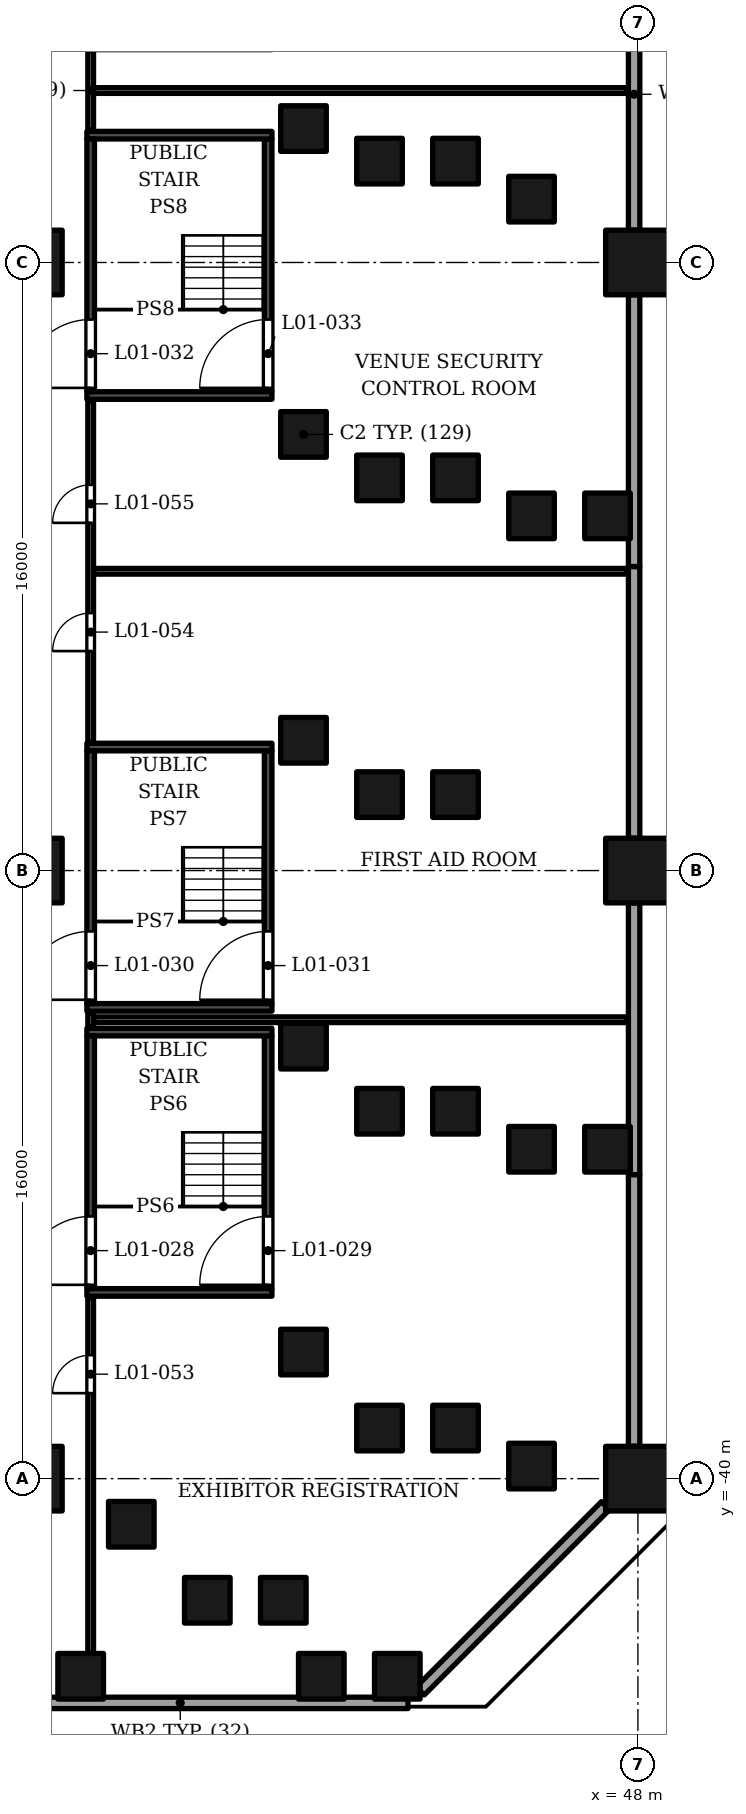
"""IFC4 building model, lengths in metres.
Left out: names, types, materials, properties, quantities, classifications, styles, units other than length and angle.
Written with IfcOpenShell. Run it as: python <this file> out.ifc"""

import sys

from ifc_helpers import new_model, si_unit, direction, frame, frame_2d, origin, origin_2d, place, context, subcontext, project, spatial, rectangle, extrude, element, fill, save


model = new_model("IFC4")
c1 = context("Model", 3, precision=1e-05, world=origin(), true_north=direction((0.0, 1.0)))
c2 = subcontext(c1, "Body", "Model", "MODEL_VIEW")
j1 = project(units=[si_unit("LENGTHUNIT", "METRE"), si_unit("PLANEANGLEUNIT", "RADIAN")], contexts=[c1])
p1 = place(None, origin())
s1 = spatial("IfcSite", under=j1, at=p1, CompositionType="ELEMENT")
p2 = place(p1, origin())
s2 = spatial("IfcBuilding", under=s1, at=p2, CompositionType="ELEMENT")
p3 = place(p2, frame((0.0, 0.0, 9.0)))
s3 = spatial("IfcBuildingStorey", under=s2, at=p3, CompositionType="ELEMENT", Elevation=9.0)
for number, where, z_axis, x_axis in (
    (1, (32.0, -40.0, 0.0), (0.0, 0.0, 1.0), (1.0, 0.0, 0.0)),
    (2, (32.0, -24.0, 0.0), (0.0, 0.0, 1.0), (1.0, 0.0, 0.0)),
    (3, (32.0, -8.0, 0.0), (0.0, 0.0, 1.0), (1.0, 0.0, 0.0)),
    (4, (48.0, -40.0, 0.0), (0.0, 0.0, 1.0), (1.0, 0.0, 0.0)),
    (5, (48.0, -24.0, 0.0), (0.0, 0.0, 1.0), (1.0, 0.0, 0.0)),
    (6, (48.0, -8.0, 0.0), (0.0, 0.0, 1.0), (1.0, 0.0, 0.0)),
):
    element("IfcColumn", number, at=place(p3, frame(where, z_axis=z_axis, x_axis=x_axis)), inside=s3, PredefinedType="COLUMN", context=c2, shape_type="SweptSolid", body=[
        extrude(rectangle(XDim=1.7, YDim=1.7, at=origin_2d()), origin(), (0.0, 0.0, 1.0), 11.0),
    ])
for number, where, z_axis, x_axis in (
    (7, (39.2, -36.669, 0.0), (0.0, 0.0, 1.0), (1.0, 0.0, 0.0)),
    (8, (34.669, -41.2, 0.0), (0.0, 0.0, 1.0), (1.0, 0.0, 0.0)),
    (9, (39.2, -4.476, 0.0), (0.0, 0.0, 1.0), (1.0, 0.0, 0.0)),
    (10, (39.2, -12.524, 0.0), (0.0, 0.0, 1.0), (1.0, 0.0, 0.0)),
    (11, (39.2, -20.572, 0.0), (0.0, 0.0, 1.0), (1.0, 0.0, 0.0)),
    (12, (39.2, -28.62, 0.0), (0.0, 0.0, 1.0), (1.0, 0.0, 0.0)),
    (13, (41.2, -38.669, 0.0), (0.0, 0.0, 1.0), (1.0, 0.0, 0.0)),
    (14, (36.669, -43.2, 0.0), (0.0, 0.0, 1.0), (1.0, 0.0, 0.0)),
    (15, (41.2, -5.333, 0.0), (0.0, 0.0, 1.0), (1.0, 0.0, 0.0)),
    (16, (41.2, -13.667, 0.0), (0.0, 0.0, 1.0), (1.0, 0.0, 0.0)),
    (17, (41.2, -22.001, 0.0), (0.0, 0.0, 1.0), (1.0, 0.0, 0.0)),
    (18, (41.2, -30.333, 0.0), (0.0, 0.0, 1.0), (1.0, 0.0, 0.0)),
    (19, (43.2, -38.669, 0.0), (0.0, 0.0, 1.0), (1.0, 0.0, 0.0)),
    (20, (38.669, -43.2, 0.0), (0.0, 0.0, 1.0), (1.0, 0.0, 0.0)),
    (21, (43.2, -5.333, 0.0), (0.0, 0.0, 1.0), (1.0, 0.0, 0.0)),
    (22, (43.2, -13.667, 0.0), (0.0, 0.0, 1.0), (1.0, 0.0, 0.0)),
    (23, (43.2, -22.001, 0.0), (0.0, 0.0, 1.0), (1.0, 0.0, 0.0)),
    (24, (43.2, -30.333, 0.0), (0.0, 0.0, 1.0), (1.0, 0.0, 0.0)),
    (25, (45.2, -39.669, 0.0), (0.0, 0.0, 1.0), (1.0, 0.0, 0.0)),
    (26, (39.669, -45.2, 0.0), (0.0, 0.0, 1.0), (1.0, 0.0, 0.0)),
    (27, (45.2, -6.333, 0.0), (0.0, 0.0, 1.0), (1.0, 0.0, 0.0)),
    (28, (45.2, -14.667, 0.0), (0.0, 0.0, 1.0), (1.0, 0.0, 0.0)),
    (29, (45.2, -31.333, 0.0), (0.0, 0.0, 1.0), (1.0, 0.0, 0.0)),
    (30, (41.669, -45.2, 0.0), (0.0, 0.0, 1.0), (1.0, 0.0, 0.0)),
    (31, (47.2, -14.667, 0.0), (0.0, 0.0, 1.0), (1.0, 0.0, 0.0)),
    (32, (47.2, -31.333, 0.0), (0.0, 0.0, 1.0), (1.0, 0.0, 0.0)),
    (33, (33.337, -45.2, 0.0), (0.0, 0.0, 1.0), (1.0, 0.0, 0.0)),
):
    element("IfcColumn", number, at=place(p3, frame(where, z_axis=z_axis, x_axis=x_axis)), inside=s3, PredefinedType="COLUMN", context=c2, shape_type="SweptSolid", body=[
        extrude(rectangle(XDim=1.2, YDim=1.2, at=origin_2d()), origin(), (0.0, 0.0, 1.0), 11.0),
    ])
p4 = place(p3, frame((29.964, -45.9, 0.0), z_axis=(0.0, 0.0, 1.0), x_axis=(1.0, 0.0, 0.0)))
e34 = element("IfcWall", 34, at=p4, inside=s3, PredefinedType="SOLIDWALL", context=c2, shape_type="SweptSolid", body=[
    extrude(rectangle(XDim=11.986, YDim=0.3, at=frame_2d((5.993, 0.0))), origin(), (0.0, 0.0, 1.0), 9.6),
])
p5 = place(p3, frame((42.271, -45.588, 0.0), z_axis=(0.0, 0.0, 1.0), x_axis=(0.707106781187, 0.707106781187, 0.0)))
e35 = element("IfcWall", 35, at=p5, inside=s3, PredefinedType="SOLIDWALL", context=c2, shape_type="SweptSolid", body=[
    extrude(rectangle(XDim=6.897, YDim=0.3, at=frame_2d((3.448, 0.0))), origin(), (0.0, 0.0, 1.0), 9.6),
])
for number, where, z_axis, x_axis in (
    (36, (47.9, -39.148, 0.0), (0.0, 0.0, 1.0), (0.0, 1.0, 0.0)),
    (37, (47.9, -32.0, 0.0), (0.0, 0.0, 1.0), (0.0, 1.0, 0.0)),
    (38, (47.9, -23.148, 0.0), (0.0, 0.0, 1.0), (0.0, 1.0, 0.0)),
    (39, (47.9, -16.0, 0.0), (0.0, 0.0, 1.0), (0.0, 1.0, 0.0)),
    (40, (47.9, -7.148, 0.0), (0.0, 0.0, 1.0), (0.0, 1.0, 0.0)),
):
    element("IfcWall", number, at=place(p3, frame(where, z_axis=z_axis, x_axis=x_axis)), inside=s3, PredefinedType="SOLIDWALL", context=c2, shape_type="SweptSolid", body=[
        extrude(rectangle(XDim=7.148, YDim=0.3, at=frame_2d((3.574, 0.0))), origin(), (0.0, 0.0, 1.0), 9.6),
    ])
p6 = place(p3, frame((40.75, -45.85, 11.0), z_axis=(0.0, 0.0, 1.0), x_axis=(1.0, 0.0, 0.0)))
e41 = element("IfcWall", 41, at=p6, inside=s3, PredefinedType="PARAPET", context=c2, shape_type="SweptSolid", body=[
    extrude(rectangle(XDim=1.25, YDim=0.3, at=frame_2d((0.625, 0.0))), origin(), (0.0, 0.0, 1.0), 1.1),
])
p7 = place(p3, frame((42.042, -45.745, 11.0), z_axis=(0.0, 0.0, 1.0), x_axis=(0.7071215324, 0.707092029666, 0.0)))
e42 = element("IfcWall", 42, at=p7, inside=s3, PredefinedType="PARAPET", context=c2, shape_type="SweptSolid", body=[
    extrude(rectangle(XDim=8.275, YDim=0.3, at=frame_2d((4.138, 0.0))), origin(), (0.0, 0.0, 1.0), 1.1),
])
for number, where, z_axis, x_axis in (
    (43, (47.85, -39.79, 11.0), (0.0, 0.0, 1.0), (0.0, 1.0, 0.0)),
    (44, (47.85, -25.093, 11.0), (0.0, 0.0, 1.0), (0.0, 1.0, 0.0)),
    (45, (47.85, -10.395, 11.0), (0.0, 0.0, 1.0), (0.0, 1.0, 0.0)),
):
    element("IfcWall", number, at=place(p3, frame(where, z_axis=z_axis, x_axis=x_axis)), inside=s3, PredefinedType="PARAPET", context=c2, shape_type="SweptSolid", body=[
        extrude(rectangle(XDim=14.698, YDim=0.3, at=frame_2d((7.349, 0.0))), origin(), (0.0, 0.0, 1.0), 1.1),
    ])
for number, where, z_axis, x_axis in (
    (46, (33.5, -35.1, 0.0), (0.0, 0.0, 1.0), (1.0, 0.0, 0.0)),
    (47, (33.5, -28.25, 0.0), (0.0, 0.0, 1.0), (1.0, 0.0, 0.0)),
):
    element("IfcWall", number, at=place(p3, frame(where, z_axis=z_axis, x_axis=x_axis)), inside=s3, PredefinedType="SOLIDWALL", context=c2, shape_type="SweptSolid", body=[
        extrude(rectangle(XDim=4.87, YDim=0.2, at=frame_2d((2.435, 0.0))), origin(), (0.0, 0.0, 1.0), 10.5),
    ])
p8 = place(p3, frame((33.6, -35.0, 0.0), z_axis=(0.0, 0.0, 1.0), x_axis=(0.0, 1.0, 0.0)))
e48 = element("IfcWall", 48, at=p8, inside=s3, PredefinedType="SOLIDWALL", context=c2, shape_type="SweptSolid", body=[
    extrude(rectangle(XDim=6.65, YDim=0.2, at=frame_2d((3.325, 0.0))), origin(), (0.0, 0.0, 1.0), 10.5),
])
p9 = place(p8, frame((0.1, 0.0, 0.0)))
e49 = element("IfcOpeningElement", 49, at=p9, cuts=e48, PredefinedType="OPENING", context=c2, shape_type="SweptSolid", body=[
    extrude(rectangle(XDim=1.8, YDim=2.4, at=frame_2d((0.9, 1.2))), frame((0.0, 0.11, 0.0), z_axis=(0.0, -1.0, 0.0), x_axis=(1.0, 0.0, 0.0)), (0.0, 0.0, 1.0), 0.22),
])
p10 = place(p3, frame((38.27, -35.0, 0.0), z_axis=(0.0, 0.0, 1.0), x_axis=(0.0, 1.0, 0.0)))
e50 = element("IfcWall", 50, at=p10, inside=s3, PredefinedType="SOLIDWALL", context=c2, shape_type="SweptSolid", body=[
    extrude(rectangle(XDim=6.65, YDim=0.2, at=frame_2d((3.325, 0.0))), origin(), (0.0, 0.0, 1.0), 10.5),
])
p11 = place(p10, frame((0.1, 0.0, 0.0)))
e51 = element("IfcOpeningElement", 51, at=p11, cuts=e50, PredefinedType="OPENING", context=c2, shape_type="SweptSolid", body=[
    extrude(rectangle(XDim=1.8, YDim=2.4, at=frame_2d((0.9, 1.2))), frame((0.0, 0.11, 0.0), z_axis=(0.0, -1.0, 0.0), x_axis=(1.0, 0.0, 0.0)), (0.0, 0.0, 1.0), 0.22),
])
for number, where, z_axis, x_axis in (
    (52, (33.5, -27.6, 0.0), (0.0, 0.0, 1.0), (1.0, 0.0, 0.0)),
    (53, (33.5, -20.75, 0.0), (0.0, 0.0, 1.0), (1.0, 0.0, 0.0)),
):
    element("IfcWall", number, at=place(p3, frame(where, z_axis=z_axis, x_axis=x_axis)), inside=s3, PredefinedType="SOLIDWALL", context=c2, shape_type="SweptSolid", body=[
        extrude(rectangle(XDim=4.87, YDim=0.2, at=frame_2d((2.435, 0.0))), origin(), (0.0, 0.0, 1.0), 10.5),
    ])
p12 = place(p3, frame((33.6, -27.5, 0.0), z_axis=(0.0, 0.0, 1.0), x_axis=(0.0, 1.0, 0.0)))
e54 = element("IfcWall", 54, at=p12, inside=s3, PredefinedType="SOLIDWALL", context=c2, shape_type="SweptSolid", body=[
    extrude(rectangle(XDim=6.65, YDim=0.2, at=frame_2d((3.325, 0.0))), origin(), (0.0, 0.0, 1.0), 10.5),
])
p13 = place(p12, frame((0.1, 0.0, 0.0)))
e55 = element("IfcOpeningElement", 55, at=p13, cuts=e54, PredefinedType="OPENING", context=c2, shape_type="SweptSolid", body=[
    extrude(rectangle(XDim=1.8, YDim=2.4, at=frame_2d((0.9, 1.2))), frame((0.0, 0.11, 0.0), z_axis=(0.0, -1.0, 0.0), x_axis=(1.0, 0.0, 0.0)), (0.0, 0.0, 1.0), 0.22),
])
p14 = place(p3, frame((38.27, -27.5, 0.0), z_axis=(0.0, 0.0, 1.0), x_axis=(0.0, 1.0, 0.0)))
e56 = element("IfcWall", 56, at=p14, inside=s3, PredefinedType="SOLIDWALL", context=c2, shape_type="SweptSolid", body=[
    extrude(rectangle(XDim=6.65, YDim=0.2, at=frame_2d((3.325, 0.0))), origin(), (0.0, 0.0, 1.0), 10.5),
])
p15 = place(p14, frame((0.1, 0.0, 0.0)))
e57 = element("IfcOpeningElement", 57, at=p15, cuts=e56, PredefinedType="OPENING", context=c2, shape_type="SweptSolid", body=[
    extrude(rectangle(XDim=1.8, YDim=2.4, at=frame_2d((0.9, 1.2))), frame((0.0, 0.11, 0.0), z_axis=(0.0, -1.0, 0.0), x_axis=(1.0, 0.0, 0.0)), (0.0, 0.0, 1.0), 0.22),
])
for number, where, z_axis, x_axis in (
    (58, (33.5, -11.5, 0.0), (0.0, 0.0, 1.0), (1.0, 0.0, 0.0)),
    (59, (33.5, -4.65, 0.0), (0.0, 0.0, 1.0), (1.0, 0.0, 0.0)),
):
    element("IfcWall", number, at=place(p3, frame(where, z_axis=z_axis, x_axis=x_axis)), inside=s3, PredefinedType="SOLIDWALL", context=c2, shape_type="SweptSolid", body=[
        extrude(rectangle(XDim=4.87, YDim=0.2, at=frame_2d((2.435, 0.0))), origin(), (0.0, 0.0, 1.0), 10.5),
    ])
p16 = place(p3, frame((33.6, -11.4, 0.0), z_axis=(0.0, 0.0, 1.0), x_axis=(0.0, 1.0, 0.0)))
e60 = element("IfcWall", 60, at=p16, inside=s3, PredefinedType="SOLIDWALL", context=c2, shape_type="SweptSolid", body=[
    extrude(rectangle(XDim=6.65, YDim=0.2, at=frame_2d((3.325, 0.0))), origin(), (0.0, 0.0, 1.0), 10.5),
])
p17 = place(p16, frame((0.1, 0.0, 0.0)))
e61 = element("IfcOpeningElement", 61, at=p17, cuts=e60, PredefinedType="OPENING", context=c2, shape_type="SweptSolid", body=[
    extrude(rectangle(XDim=1.8, YDim=2.4, at=frame_2d((0.9, 1.2))), frame((0.0, 0.11, 0.0), z_axis=(0.0, -1.0, 0.0), x_axis=(1.0, 0.0, 0.0)), (0.0, 0.0, 1.0), 0.22),
])
p18 = place(p3, frame((38.27, -11.4, 0.0), z_axis=(0.0, 0.0, 1.0), x_axis=(0.0, 1.0, 0.0)))
e62 = element("IfcWall", 62, at=p18, inside=s3, PredefinedType="SOLIDWALL", context=c2, shape_type="SweptSolid", body=[
    extrude(rectangle(XDim=6.65, YDim=0.2, at=frame_2d((3.325, 0.0))), origin(), (0.0, 0.0, 1.0), 10.5),
])
p19 = place(p18, frame((0.1, 0.0, 0.0)))
e63 = element("IfcOpeningElement", 63, at=p19, cuts=e62, PredefinedType="OPENING", context=c2, shape_type="SweptSolid", body=[
    extrude(rectangle(XDim=1.8, YDim=2.4, at=frame_2d((0.9, 1.2))), frame((0.0, 0.11, 0.0), z_axis=(0.0, -1.0, 0.0), x_axis=(1.0, 0.0, 0.0)), (0.0, 0.0, 1.0), 0.22),
])
p20 = place(p3, frame((33.6, -44.6, 0.0), z_axis=(0.0, 0.0, 1.0), x_axis=(0.0, 1.0, 0.0)))
e64 = element("IfcWall", 64, at=p20, inside=s3, PredefinedType="PARTITIONING", context=c2, shape_type="SweptSolid", body=[
    extrude(rectangle(XDim=9.36, YDim=0.15, at=frame_2d((4.68, 0.0))), origin(), (0.0, 0.0, 1.0), 9.3),
])
p21 = place(p20, frame((6.849, 0.0, 0.0)))
e65 = element("IfcOpeningElement", 65, at=p21, cuts=e64, PredefinedType="OPENING", context=c2, shape_type="SweptSolid", body=[
    extrude(rectangle(XDim=1.0, YDim=2.1, at=frame_2d((0.5, 1.05))), frame((0.0, 0.085, 0.0), z_axis=(0.0, -1.0, 0.0), x_axis=(1.0, 0.0, 0.0)), (0.0, 0.0, 1.0), 0.17),
])
p22 = place(p3, frame((33.6, -28.11, 0.0), z_axis=(0.0, 0.0, 1.0), x_axis=(0.0, 1.0, 0.0)))
e66 = element("IfcWall", 66, at=p22, inside=s3, PredefinedType="PARTITIONING", context=c2, shape_type="SweptSolid", body=[
    extrude(rectangle(XDim=0.37, YDim=0.15, at=frame_2d((0.185, 0.0))), origin(), (0.0, 0.0, 1.0), 10.5),
])
p23 = place(p3, frame((33.675, -27.925, 0.0), z_axis=(0.0, 0.0, 1.0), x_axis=(1.0, 0.0, 0.0)))
e67 = element("IfcWall", 67, at=p23, inside=s3, PredefinedType="PARTITIONING", context=c2, shape_type="SweptSolid", body=[
    extrude(rectangle(XDim=14.045, YDim=0.15, at=frame_2d((7.022, 0.0))), origin(), (0.0, 0.0, 1.0), 9.6),
])
p24 = place(p3, frame((33.6, -20.61, 0.0), z_axis=(0.0, 0.0, 1.0), x_axis=(0.0, 1.0, 0.0)))
e68 = element("IfcWall", 68, at=p24, inside=s3, PredefinedType="PARTITIONING", context=c2, shape_type="SweptSolid", body=[
    extrude(rectangle(XDim=8.97, YDim=0.15, at=frame_2d((4.485, 0.0))), origin(), (0.0, 0.0, 1.0), 10.5),
])
p25 = place(p24, frame((2.385, 0.0, 0.0)))
e69 = element("IfcOpeningElement", 69, at=p25, cuts=e68, PredefinedType="OPENING", context=c2, shape_type="SweptSolid", body=[
    extrude(rectangle(XDim=1.0, YDim=2.1, at=frame_2d((0.5, 1.05))), frame((0.0, 0.085, 0.0), z_axis=(0.0, -1.0, 0.0), x_axis=(1.0, 0.0, 0.0)), (0.0, 0.0, 1.0), 0.17),
])
p26 = place(p24, frame((5.759, 0.0, 0.0)))
e70 = element("IfcOpeningElement", 70, at=p26, cuts=e68, PredefinedType="OPENING", context=c2, shape_type="SweptSolid", body=[
    extrude(rectangle(XDim=1.0, YDim=2.1, at=frame_2d((0.5, 1.05))), frame((0.0, 0.085, 0.0), z_axis=(0.0, -1.0, 0.0), x_axis=(1.0, 0.0, 0.0)), (0.0, 0.0, 1.0), 0.17),
])
p27 = place(p3, frame((33.675, -16.125, 0.0), z_axis=(0.0, 0.0, 1.0), x_axis=(1.0, 0.0, 0.0)))
e71 = element("IfcWall", 71, at=p27, inside=s3, PredefinedType="PARTITIONING", context=c2, shape_type="SweptSolid", body=[
    extrude(rectangle(XDim=14.045, YDim=0.15, at=frame_2d((7.022, 0.0))), origin(), (0.0, 0.0, 1.0), 9.6),
])
p28 = place(p3, frame((33.6, -4.51, 0.0), z_axis=(0.0, 0.0, 1.0), x_axis=(0.0, 1.0, 0.0)))
e72 = element("IfcWall", 72, at=p28, inside=s3, PredefinedType="PARTITIONING", context=c2, shape_type="SweptSolid", body=[
    extrude(rectangle(XDim=2.07, YDim=0.15, at=frame_2d((1.035, 0.0))), origin(), (0.0, 0.0, 1.0), 10.5),
])
p29 = place(p3, frame((33.675, -3.475, 0.0), z_axis=(0.0, 0.0, 1.0), x_axis=(1.0, 0.0, 0.0)))
e73 = element("IfcWall", 73, at=p29, inside=s3, PredefinedType="PARTITIONING", context=c2, shape_type="SweptSolid", body=[
    extrude(rectangle(XDim=14.045, YDim=0.15, at=frame_2d((7.022, 0.0))), origin(), (0.0, 0.0, 1.0), 9.6),
])
p30 = place(p9, origin())
e74 = element("IfcDoor", 74, at=p30, inside=s3, OperationType="DOUBLE_DOOR_SINGLE_SWING", PredefinedType="DOOR", context=c2, shape_type="SweptSolid", body=[
    extrude(rectangle(XDim=1.8, YDim=2.4, at=frame_2d((0.9, 1.2))), frame((0.0, 0.025, 0.0), z_axis=(0.0, -1.0, 0.0), x_axis=(1.0, 0.0, 0.0)), (0.0, 0.0, 1.0), 0.05),
])
fill(e49, e74)
p31 = place(p11, origin())
e75 = element("IfcDoor", 75, at=p31, inside=s3, OperationType="DOUBLE_DOOR_SINGLE_SWING", PredefinedType="DOOR", context=c2, shape_type="SweptSolid", body=[
    extrude(rectangle(XDim=1.8, YDim=2.4, at=frame_2d((0.9, 1.2))), frame((0.0, 0.025, 0.0), z_axis=(0.0, -1.0, 0.0), x_axis=(1.0, 0.0, 0.0)), (0.0, 0.0, 1.0), 0.05),
])
fill(e51, e75)
p32 = place(p13, origin())
e76 = element("IfcDoor", 76, at=p32, inside=s3, OperationType="DOUBLE_DOOR_SINGLE_SWING", PredefinedType="DOOR", context=c2, shape_type="SweptSolid", body=[
    extrude(rectangle(XDim=1.8, YDim=2.4, at=frame_2d((0.9, 1.2))), frame((0.0, 0.025, 0.0), z_axis=(0.0, -1.0, 0.0), x_axis=(1.0, 0.0, 0.0)), (0.0, 0.0, 1.0), 0.05),
])
fill(e55, e76)
p33 = place(p15, origin())
e77 = element("IfcDoor", 77, at=p33, inside=s3, OperationType="DOUBLE_DOOR_SINGLE_SWING", PredefinedType="DOOR", context=c2, shape_type="SweptSolid", body=[
    extrude(rectangle(XDim=1.8, YDim=2.4, at=frame_2d((0.9, 1.2))), frame((0.0, 0.025, 0.0), z_axis=(0.0, -1.0, 0.0), x_axis=(1.0, 0.0, 0.0)), (0.0, 0.0, 1.0), 0.05),
])
fill(e57, e77)
p34 = place(p17, origin())
e78 = element("IfcDoor", 78, at=p34, inside=s3, OperationType="DOUBLE_DOOR_SINGLE_SWING", PredefinedType="DOOR", context=c2, shape_type="SweptSolid", body=[
    extrude(rectangle(XDim=1.8, YDim=2.4, at=frame_2d((0.9, 1.2))), frame((0.0, 0.025, 0.0), z_axis=(0.0, -1.0, 0.0), x_axis=(1.0, 0.0, 0.0)), (0.0, 0.0, 1.0), 0.05),
])
fill(e61, e78)
p35 = place(p19, origin())
e79 = element("IfcDoor", 79, at=p35, inside=s3, OperationType="DOUBLE_DOOR_SINGLE_SWING", PredefinedType="DOOR", context=c2, shape_type="SweptSolid", body=[
    extrude(rectangle(XDim=1.8, YDim=2.4, at=frame_2d((0.9, 1.2))), frame((0.0, 0.025, 0.0), z_axis=(0.0, -1.0, 0.0), x_axis=(1.0, 0.0, 0.0)), (0.0, 0.0, 1.0), 0.05),
])
fill(e63, e79)
p36 = place(p21, origin())
e80 = element("IfcDoor", 80, at=p36, inside=s3, OperationType="SINGLE_SWING_LEFT", PredefinedType="DOOR", context=c2, shape_type="SweptSolid", body=[
    extrude(rectangle(XDim=1.0, YDim=2.1, at=frame_2d((0.5, 1.05))), frame((0.0, 0.025, 0.0), z_axis=(0.0, -1.0, 0.0), x_axis=(1.0, 0.0, 0.0)), (0.0, 0.0, 1.0), 0.05),
])
fill(e65, e80)
p37 = place(p25, origin())
e81 = element("IfcDoor", 81, at=p37, inside=s3, OperationType="SINGLE_SWING_LEFT", PredefinedType="DOOR", context=c2, shape_type="SweptSolid", body=[
    extrude(rectangle(XDim=1.0, YDim=2.1, at=frame_2d((0.5, 1.05))), frame((0.0, 0.025, 0.0), z_axis=(0.0, -1.0, 0.0), x_axis=(1.0, 0.0, 0.0)), (0.0, 0.0, 1.0), 0.05),
])
fill(e69, e81)
p38 = place(p26, origin())
e82 = element("IfcDoor", 82, at=p38, inside=s3, OperationType="SINGLE_SWING_LEFT", PredefinedType="DOOR", context=c2, shape_type="SweptSolid", body=[
    extrude(rectangle(XDim=1.0, YDim=2.1, at=frame_2d((0.5, 1.05))), frame((0.0, 0.025, 0.0), z_axis=(0.0, -1.0, 0.0), x_axis=(1.0, 0.0, 0.0)), (0.0, 0.0, 1.0), 0.05),
])
fill(e70, e82)
save(model, sys.argv[1])
